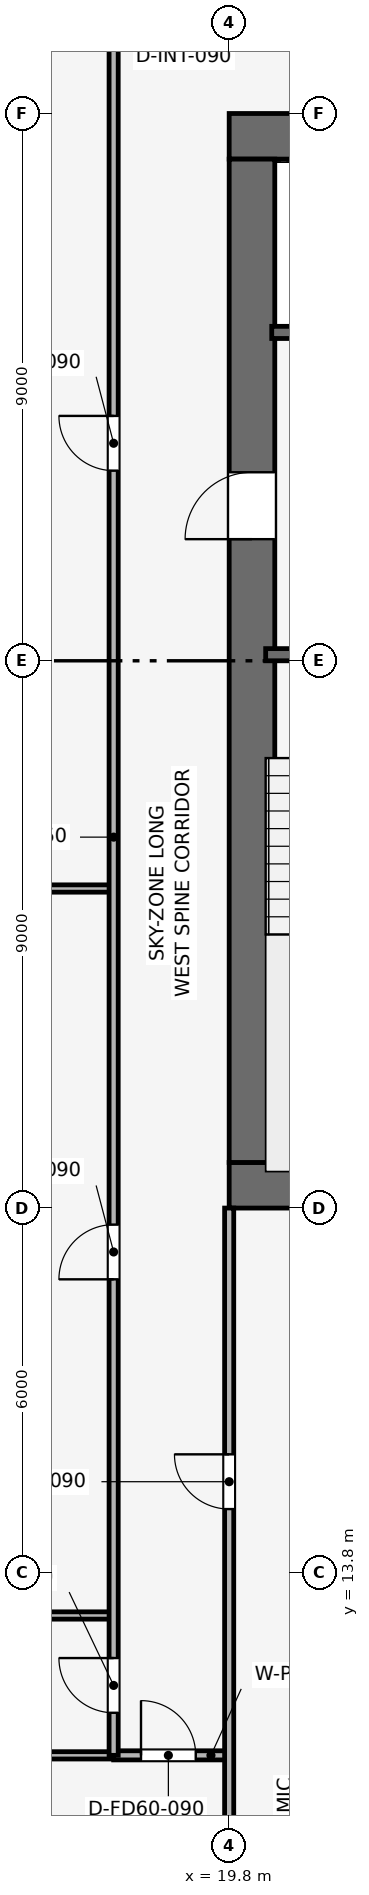
"""IFC4 building model, lengths in metres.
Left out: names, types, materials, properties, quantities, classifications, styles, units other than length and angle.
Written with IfcOpenShell. Run it as: python <this file> out.ifc"""

import sys

from ifc_helpers import new_model, si_unit, direction, frame, frame_2d, origin, place, context, subcontext, project, spatial, rectangle, extrude, element, fill, save


model = new_model("IFC4")
c1 = context("Model", 3, precision=1e-05, world=origin(), true_north=direction((0.0, 1.0)))
c2 = subcontext(c1, "Body", "Model", "MODEL_VIEW")
j1 = project(units=[si_unit("LENGTHUNIT", "METRE"), si_unit("PLANEANGLEUNIT", "RADIAN")], contexts=[c1])
p1 = place(None, origin())
s1 = spatial("IfcSite", under=j1, at=p1, CompositionType="ELEMENT")
p2 = place(p1, origin())
s2 = spatial("IfcBuilding", under=s1, at=p2, CompositionType="ELEMENT")
p3 = place(p2, frame((0.0, 0.0, 254.1)))
s3 = spatial("IfcBuildingStorey", under=s2, at=p3, CompositionType="ELEMENT", Elevation=254.1)
p4 = place(p3, frame((19.8, 20.175, 0.0), z_axis=(0.0, 0.0, 1.0), x_axis=(1.0, 0.0, 0.0)))
e1 = element("IfcWall", 1, at=p4, inside=s3, PredefinedType="SHEAR", context=c2, shape_type="SweptSolid", body=[
    extrude(rectangle(XDim=18.0, YDim=0.75, at=frame_2d((9.0, 0.0))), origin(), (0.0, 0.0, 1.0), 3.75),
])
p5 = place(p3, frame((19.8, 37.425, 0.0), z_axis=(0.0, 0.0, 1.0), x_axis=(1.0, 0.0, 0.0)))
e2 = element("IfcWall", 2, at=p5, inside=s3, PredefinedType="SHEAR", context=c2, shape_type="SweptSolid", body=[
    extrude(rectangle(XDim=18.0, YDim=0.75, at=frame_2d((9.0, 0.0))), origin(), (0.0, 0.0, 1.0), 3.75),
])
p6 = place(p5, frame((7.05, 0.0, 0.0)))
e3 = element("IfcOpeningElement", 3, at=p6, cuts=e2, PredefinedType="OPENING", context=c2, shape_type="SweptSolid", body=[
    extrude(rectangle(XDim=1.1, YDim=2.15, at=frame_2d((0.55, 1.075))), frame((0.0, 0.385, 0.0), z_axis=(0.0, -1.0, 0.0), x_axis=(1.0, 0.0, 0.0)), (0.0, 0.0, 1.0), 0.77),
])
p7 = place(p3, frame((20.175, 20.55, 0.0), z_axis=(0.0, 0.0, 1.0), x_axis=(0.0, 1.0, 0.0)))
e4 = element("IfcWall", 4, at=p7, inside=s3, PredefinedType="SHEAR", context=c2, shape_type="SweptSolid", body=[
    extrude(rectangle(XDim=16.5, YDim=0.75, at=frame_2d((8.25, 0.0))), origin(), (0.0, 0.0, 1.0), 3.75),
])
p8 = place(p7, frame((10.25, 0.0, 0.0)))
e5 = element("IfcOpeningElement", 5, at=p8, cuts=e4, PredefinedType="OPENING", context=c2, shape_type="SweptSolid", body=[
    extrude(rectangle(XDim=1.1, YDim=2.15, at=frame_2d((0.55, 1.075))), frame((0.0, 0.385, 0.0), z_axis=(0.0, -1.0, 0.0), x_axis=(1.0, 0.0, 0.0)), (0.0, 0.0, 1.0), 0.77),
])
p9 = place(p3, frame((20.4, 28.9, 0.0), z_axis=(0.0, 0.0, 1.0), x_axis=(1.0, 0.0, 0.0)))
e6 = element("IfcWall", 6, at=p9, inside=s3, PredefinedType="SHEAR", context=c2, shape_type="SweptSolid", body=[
    extrude(rectangle(XDim=3.15, YDim=0.2, at=frame_2d((1.575, 0.0))), origin(), (0.0, 0.0, 1.0), 3.5),
])
p10 = place(p9, frame((0.8, 0.0, 0.0)))
e7 = element("IfcOpeningElement", 7, at=p10, cuts=e6, PredefinedType="OPENING", context=c2, shape_type="SweptSolid", body=[
    extrude(rectangle(XDim=1.0, YDim=2.1, at=frame_2d((0.5, 1.05))), frame((0.0, 0.11, 0.0), z_axis=(0.0, -1.0, 0.0), x_axis=(1.0, 0.0, 0.0)), (0.0, 0.0, 1.0), 0.22),
])
p11 = place(p3, frame((20.5, 34.2, 0.0), z_axis=(0.0, 0.0, 1.0), x_axis=(1.0, 0.0, 0.0)))
e8 = element("IfcWall", 8, at=p11, inside=s3, PredefinedType="SHEAR", context=c2, shape_type="SweptSolid", body=[
    extrude(rectangle(XDim=3.05, YDim=0.2, at=frame_2d((1.525, 0.0))), origin(), (0.0, 0.0, 1.0), 3.5),
])
p12 = place(p11, frame((0.75, 0.0, 0.0)))
e9 = element("IfcOpeningElement", 9, at=p12, cuts=e8, PredefinedType="OPENING", context=c2, shape_type="SweptSolid", body=[
    extrude(rectangle(XDim=1.1, YDim=2.15, at=frame_2d((0.55, 1.075))), frame((0.0, 0.11, 0.0), z_axis=(0.0, -1.0, 0.0), x_axis=(1.0, 0.0, 0.0)), (0.0, 0.0, 1.0), 0.22),
])
for number, where, z_axis, x_axis in (
    (10, (4.03, 13.1, 0.0), (0.0, 0.0, 1.0), (1.0, 0.0, 0.0)),
    (11, (4.03, 25.055, 0.0), (0.0, 0.0, 1.0), (1.0, 0.0, 0.0)),
):
    element("IfcWall", number, at=place(p3, frame(where, z_axis=z_axis, x_axis=x_axis)), inside=s3, PredefinedType="PARTITIONING", context=c2, shape_type="SweptSolid", body=[
        extrude(rectangle(XDim=13.87, YDim=0.12, at=frame_2d((6.935, 0.0))), origin(), (0.0, 0.0, 1.0), 3.085),
    ])
p13 = place(p3, frame((10.8, 10.8, 0.0), z_axis=(0.0, 0.0, 1.0), x_axis=(1.0, 0.0, 0.0)))
e12 = element("IfcWall", 12, at=p13, inside=s3, PredefinedType="PARTITIONING", context=c2, shape_type="SweptSolid", body=[
    extrude(rectangle(XDim=7.1, YDim=0.12, at=frame_2d((3.55, 0.0))), origin(), (0.0, 0.0, 1.0), 3.085),
])
p14 = place(p3, frame((17.9, 10.8, 0.0), z_axis=(0.0, 0.0, 1.0), x_axis=(1.0, 0.0, 0.0)))
e13 = element("IfcWall", 13, at=p14, inside=s3, PredefinedType="PARTITIONING", context=c2, shape_type="SweptSolid", body=[
    extrude(rectangle(XDim=1.9, YDim=0.15, at=frame_2d((0.95, 0.0))), origin(), (0.0, 0.0, 1.0), 3.5),
])
p15 = place(p14, frame((0.45, 0.0, 0.0)))
e14 = element("IfcOpeningElement", 14, at=p15, cuts=e13, PredefinedType="OPENING", context=c2, shape_type="SweptSolid", body=[
    extrude(rectangle(XDim=0.9, YDim=2.1, at=frame_2d((0.45, 1.05))), frame((0.0, 0.085, 0.0), z_axis=(0.0, -1.0, 0.0), x_axis=(1.0, 0.0, 0.0)), (0.0, 0.0, 1.0), 0.17),
])
p16 = place(p3, frame((19.8, 4.03, 0.0), z_axis=(0.0, 0.0, 1.0), x_axis=(0.0, 1.0, 0.0)))
e15 = element("IfcWall", 15, at=p16, inside=s3, PredefinedType="PARTITIONING", context=c2, shape_type="SweptSolid", body=[
    extrude(rectangle(XDim=15.77, YDim=0.15, at=frame_2d((7.885, 0.0))), origin(), (0.0, 0.0, 1.0), 3.085),
])
p17 = place(p16, frame((10.82, 0.0, 0.0)))
e16 = element("IfcOpeningElement", 16, at=p17, cuts=e15, PredefinedType="OPENING", context=c2, shape_type="SweptSolid", body=[
    extrude(rectangle(XDim=0.9, YDim=2.1, at=frame_2d((0.45, 1.05))), frame((0.0, 0.085, 0.0), z_axis=(0.0, -1.0, 0.0), x_axis=(1.0, 0.0, 0.0)), (0.0, 0.0, 1.0), 0.17),
])
p18 = place(p3, frame((17.9, 10.8, 0.0), z_axis=(0.0, 0.0, 1.0), x_axis=(0.0, 1.0, 0.0)))
e17 = element("IfcWall", 17, at=p18, inside=s3, PredefinedType="PARTITIONING", context=c2, shape_type="SweptSolid", body=[
    extrude(rectangle(XDim=28.9, YDim=0.15, at=frame_2d((14.45, 0.0))), origin(), (0.0, 0.0, 1.0), 3.085),
])
p19 = place(p18, frame((0.7, 0.0, 0.0)))
e18 = element("IfcOpeningElement", 18, at=p19, cuts=e17, PredefinedType="OPENING", context=c2, shape_type="SweptSolid", body=[
    extrude(rectangle(XDim=0.9, YDim=2.1, at=frame_2d((0.45, 1.05))), frame((0.0, 0.085, 0.0), z_axis=(0.0, -1.0, 0.0), x_axis=(1.0, 0.0, 0.0)), (0.0, 0.0, 1.0), 0.17),
])
p20 = place(p18, frame((7.828, 0.0, 0.0)))
e19 = element("IfcOpeningElement", 19, at=p20, cuts=e17, PredefinedType="OPENING", context=c2, shape_type="SweptSolid", body=[
    extrude(rectangle(XDim=0.9, YDim=2.1, at=frame_2d((0.45, 1.05))), frame((0.0, 0.085, 0.0), z_axis=(0.0, -1.0, 0.0), x_axis=(1.0, 0.0, 0.0)), (0.0, 0.0, 1.0), 0.17),
])
p21 = place(p18, frame((21.127, 0.0, 0.0)))
e20 = element("IfcOpeningElement", 20, at=p21, cuts=e17, PredefinedType="OPENING", context=c2, shape_type="SweptSolid", body=[
    extrude(rectangle(XDim=0.9, YDim=2.1, at=frame_2d((0.45, 1.05))), frame((0.0, 0.085, 0.0), z_axis=(0.0, -1.0, 0.0), x_axis=(1.0, 0.0, 0.0)), (0.0, 0.0, 1.0), 0.17),
])
p22 = place(p15, origin())
e21 = element("IfcDoor", 21, at=p22, inside=s3, OperationType="SINGLE_SWING_LEFT", PredefinedType="DOOR", context=c2, shape_type="SweptSolid", body=[
    extrude(rectangle(XDim=0.9, YDim=2.1, at=frame_2d((0.45, 1.05))), frame((0.0, 0.025, 0.0), z_axis=(0.0, -1.0, 0.0), x_axis=(1.0, 0.0, 0.0)), (0.0, 0.0, 1.0), 0.05),
])
fill(e14, e21)
p23 = place(p17, origin())
e22 = element("IfcDoor", 22, at=p23, inside=s3, OperationType="SINGLE_SWING_RIGHT", PredefinedType="DOOR", context=c2, shape_type="SweptSolid", body=[
    extrude(rectangle(XDim=0.9, YDim=2.1, at=frame_2d((0.45, 1.05))), frame((0.0, 0.025, 0.0), z_axis=(0.0, -1.0, 0.0), x_axis=(1.0, 0.0, 0.0)), (0.0, 0.0, 1.0), 0.05),
])
fill(e16, e22)
p24 = place(p19, origin())
e23 = element("IfcDoor", 23, at=p24, inside=s3, OperationType="SINGLE_SWING_RIGHT", PredefinedType="DOOR", context=c2, shape_type="SweptSolid", body=[
    extrude(rectangle(XDim=0.9, YDim=2.1, at=frame_2d((0.45, 1.05))), frame((0.0, 0.025, 0.0), z_axis=(0.0, -1.0, 0.0), x_axis=(1.0, 0.0, 0.0)), (0.0, 0.0, 1.0), 0.05),
])
fill(e18, e23)
p25 = place(p20, origin())
e24 = element("IfcDoor", 24, at=p25, inside=s3, OperationType="SINGLE_SWING_LEFT", PredefinedType="DOOR", context=c2, shape_type="SweptSolid", body=[
    extrude(rectangle(XDim=0.9, YDim=2.1, at=frame_2d((0.45, 1.05))), frame((0.0, 0.025, 0.0), z_axis=(0.0, -1.0, 0.0), x_axis=(1.0, 0.0, 0.0)), (0.0, 0.0, 1.0), 0.05),
])
fill(e19, e24)
p26 = place(p21, origin())
e25 = element("IfcDoor", 25, at=p26, inside=s3, OperationType="SINGLE_SWING_RIGHT", PredefinedType="DOOR", context=c2, shape_type="SweptSolid", body=[
    extrude(rectangle(XDim=0.9, YDim=2.1, at=frame_2d((0.45, 1.05))), frame((0.0, 0.025, 0.0), z_axis=(0.0, -1.0, 0.0), x_axis=(1.0, 0.0, 0.0)), (0.0, 0.0, 1.0), 0.05),
])
fill(e20, e25)
p27 = place(p8, origin())
e26 = element("IfcDoor", 26, at=p27, inside=s3, OperationType="SINGLE_SWING_LEFT", PredefinedType="DOOR", context=c2, shape_type="SweptSolid", body=[
    extrude(rectangle(XDim=1.1, YDim=2.15, at=frame_2d((0.55, 1.075))), frame((0.0, 0.025, 0.0), z_axis=(0.0, -1.0, 0.0), x_axis=(1.0, 0.0, 0.0)), (0.0, 0.0, 1.0), 0.05),
])
fill(e5, e26)
save(model, sys.argv[1])
